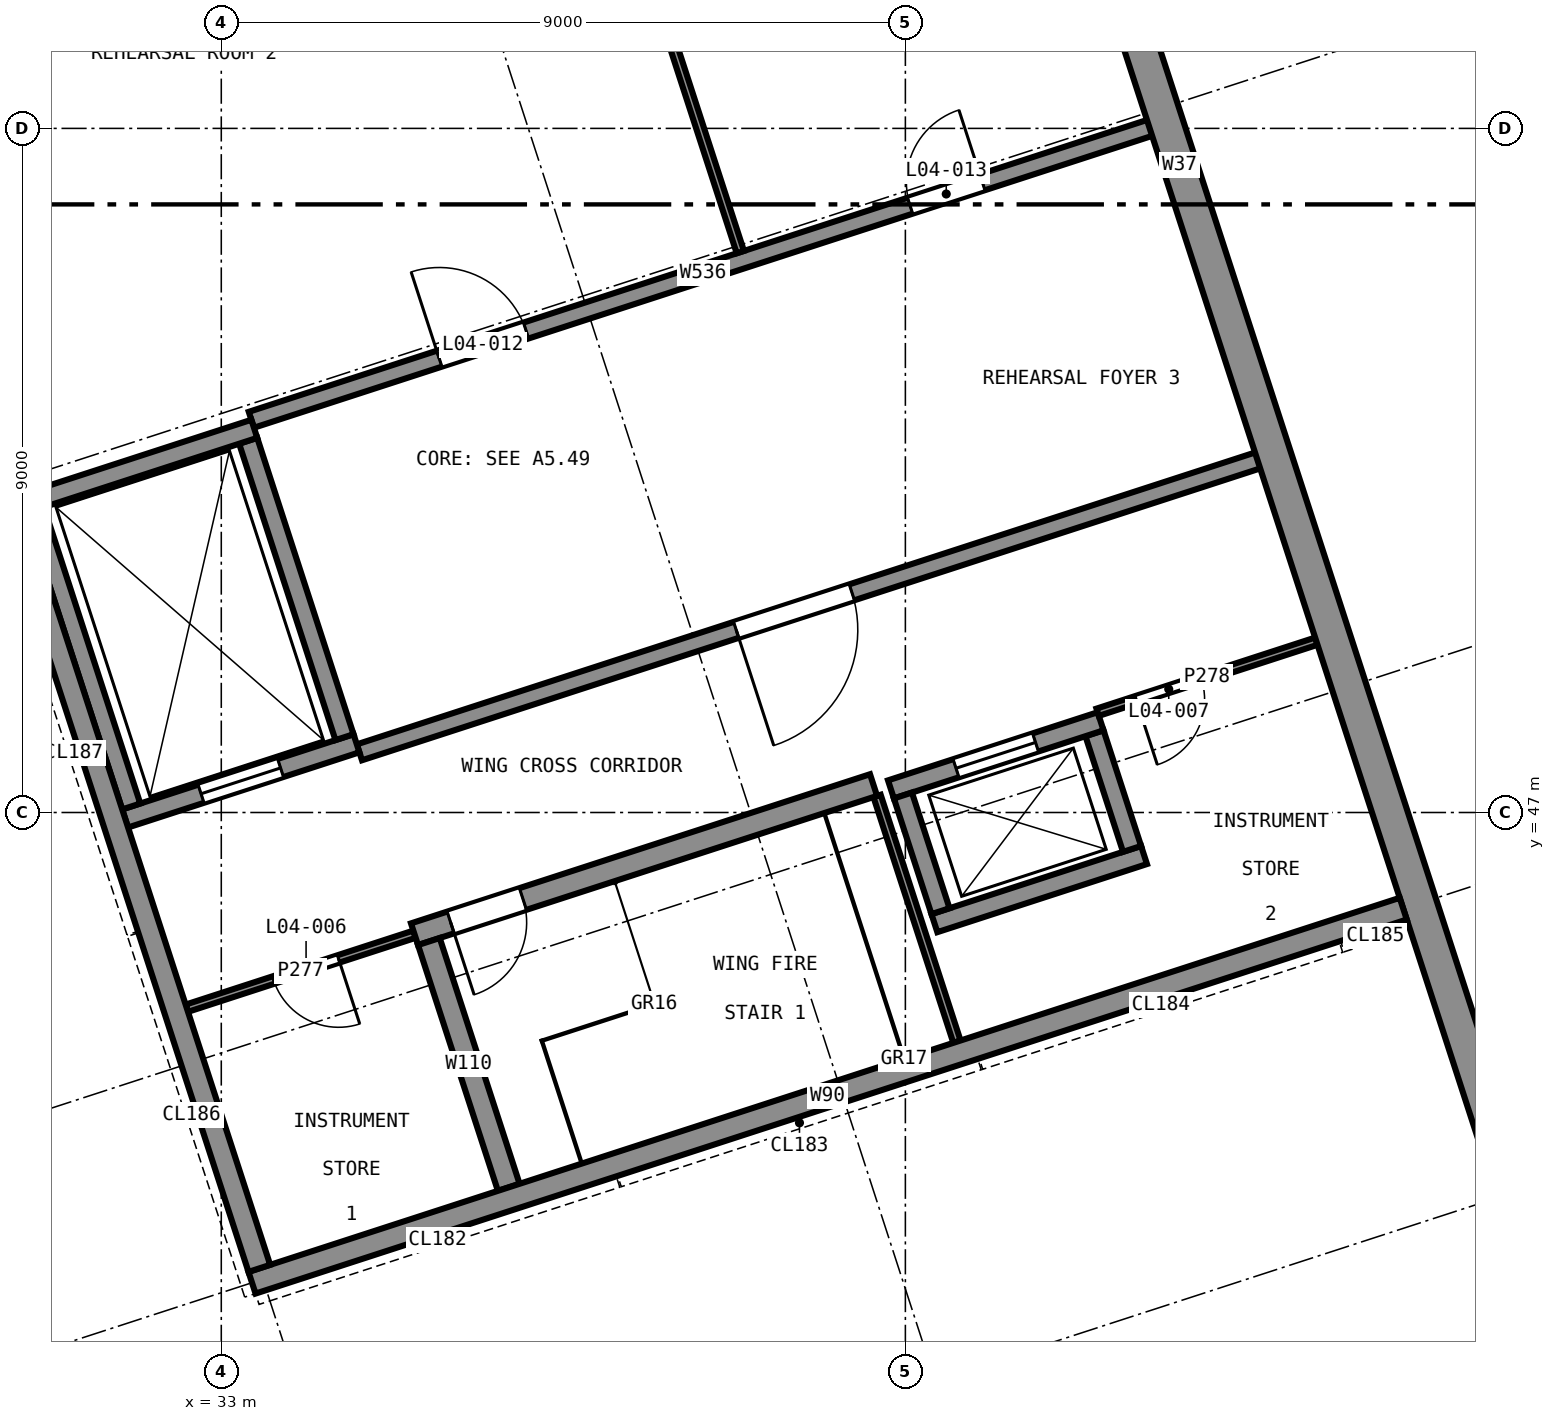
"""IFC4 building model, lengths in metres.
Left out: names, types, materials, properties, quantities, classifications, styles, units other than length and angle.
Written with IfcOpenShell. Run it as: python <this file> out.ifc"""

import sys

from ifc_helpers import new_model, si_unit, direction, frame, frame_2d, origin, place, context, subcontext, project, spatial, rectangle, extrude, element, fill, save


model = new_model("IFC4")
c1 = context("Model", 3, precision=1e-05, world=origin(), true_north=direction((0.0, 1.0)))
c2 = subcontext(c1, "Body", "Model", "MODEL_VIEW")
j1 = project(units=[si_unit("LENGTHUNIT", "METRE"), si_unit("PLANEANGLEUNIT", "RADIAN")], contexts=[c1])
p1 = place(None, origin())
s1 = spatial("IfcSite", under=j1, at=p1, CompositionType="ELEMENT")
p2 = place(p1, origin())
s2 = spatial("IfcBuilding", under=s1, at=p2, CompositionType="ELEMENT")
p3 = place(p2, frame((0.0, 0.0, 17.5)))
s3 = spatial("IfcBuildingStorey", under=s2, at=p3, CompositionType="ELEMENT", Elevation=17.5)
p4 = place(p3, frame((49.93, 42.214, 0.0), z_axis=(0.0, 0.0, 1.0), x_axis=(-0.309016215614, 0.95105676933, 0.0)))
e1 = element("IfcWall", 1, at=p4, inside=s3, PredefinedType="SHEAR", context=c2, shape_type="SweptSolid", body=[
    extrude(rectangle(XDim=27.975, YDim=0.45, at=frame_2d((13.988, 0.0))), origin(), (0.0, 0.0, 1.0), 4.0),
])
p5 = place(p3, frame((48.55, 45.735, 0.0), z_axis=(0.0, 0.0, 1.0), x_axis=(-0.951061216338, -0.309002528757, 0.0)))
e2 = element("IfcWall", 2, at=p5, inside=s3, PredefinedType="SOLIDWALL", context=c2, shape_type="SweptSolid", body=[
    extrude(rectangle(XDim=15.925, YDim=0.3, at=frame_2d((7.962, 0.0))), origin(), (0.0, 0.0, 1.0), 4.0),
])
p6 = place(p3, frame((33.501, 41.003, 0.0), z_axis=(0.0, 0.0, 1.0), x_axis=(-0.309018056255, 0.951056171269, 0.0)))
e3 = element("IfcWall", 3, at=p6, inside=s3, PredefinedType="SOLIDWALL", context=c2, shape_type="SweptSolid", body=[
    extrude(rectangle(XDim=23.7, YDim=0.3, at=frame_2d((11.85, 0.0))), origin(), (0.0, 0.0, 1.0), 4.0),
])
p7 = place(p6, frame((11.55, 0.0, 0.9)))
e4 = element("IfcOpeningElement", 4, at=p7, cuts=e3, PredefinedType="OPENING", context=c2, shape_type="SweptSolid", body=[
    extrude(rectangle(XDim=3.6, YDim=2.1, at=frame_2d((1.8, 1.05))), frame((0.0, 0.16, 0.0), z_axis=(0.0, -1.0, 0.0), x_axis=(1.0, 0.0, 0.0)), (0.0, 0.0, 1.0), 0.32),
])
p8 = place(p3, frame((41.581, 47.361, 0.0), z_axis=(0.0, 0.0, 1.0), x_axis=(-0.951058929949, -0.309009565815, 0.0)))
e5 = element("IfcWall", 5, at=p8, inside=s3, PredefinedType="SOLIDWALL", context=c2, shape_type="SweptSolid", body=[
    extrude(rectangle(XDim=6.35, YDim=0.3, at=frame_2d((3.175, 0.0))), origin(), (0.0, 0.0, 1.0), 3.7),
])
p9 = place(p8, frame((4.85, 0.0, 0.0)))
e6 = element("IfcOpeningElement", 6, at=p9, cuts=e5, PredefinedType="OPENING", context=c2, shape_type="SweptSolid", body=[
    extrude(rectangle(XDim=1.0, YDim=2.1, at=frame_2d((0.5, 1.05))), frame((0.0, 0.16, 0.0), z_axis=(0.0, -1.0, 0.0), x_axis=(1.0, 0.0, 0.0)), (0.0, 0.0, 1.0), 0.32),
])
p10 = place(p3, frame((35.731, 45.302, 0.0), z_axis=(0.0, 0.0, 1.0), x_axis=(0.308980533303, -0.951068362443, 0.0)))
e7 = element("IfcWall", 7, at=p10, inside=s3, PredefinedType="SOLIDWALL", context=c2, shape_type="SweptSolid", body=[
    extrude(rectangle(XDim=3.4, YDim=0.3, at=frame_2d((1.7, 0.0))), origin(), (0.0, 0.0, 1.0), 3.7),
])
p11 = place(p3, frame((42.382, 45.544, 0.0), z_axis=(0.0, 0.0, 1.0), x_axis=(0.951071801089, 0.308969948659, 0.0)))
e8 = element("IfcWall", 8, at=p11, inside=s3, PredefinedType="SHEAR", context=c2, shape_type="SweptSolid", body=[
    extrude(rectangle(XDim=2.9, YDim=0.25, at=frame_2d((1.45, 0.0))), origin(), (0.0, 0.0, 1.0), 4.0),
])
p12 = place(p3, frame((44.982, 46.521, 0.0), z_axis=(0.0, 0.0, 1.0), x_axis=(-0.308986014439, 0.951066581729, 0.0)))
e9 = element("IfcWall", 9, at=p12, inside=s3, PredefinedType="SHEAR", context=c2, shape_type="SweptSolid", body=[
    extrude(rectangle(XDim=1.6, YDim=0.25, at=frame_2d((0.8, 0.0))), origin(), (0.0, 0.0, 1.0), 4.0),
])
p13 = place(p3, frame((44.568, 48.2, 0.0), z_axis=(0.0, 0.0, 1.0), x_axis=(-0.951047059821, -0.309046096893, 0.0)))
e10 = element("IfcWall", 10, at=p13, inside=s3, PredefinedType="SHEAR", context=c2, shape_type="SweptSolid", body=[
    extrude(rectangle(XDim=2.9, YDim=0.25, at=frame_2d((1.45, 0.0))), origin(), (0.0, 0.0, 1.0), 4.0),
])
p14 = place(p13, frame((0.9, 0.0, 0.0)))
e11 = element("IfcOpeningElement", 11, at=p14, cuts=e10, PredefinedType="OPENING", context=c2, shape_type="SweptSolid", body=[
    extrude(rectangle(XDim=1.1, YDim=2.1, at=frame_2d((0.55, 1.05))), frame((0.0, 0.135, 0.0), z_axis=(0.0, -1.0, 0.0), x_axis=(1.0, 0.0, 0.0)), (0.0, 0.0, 1.0), 0.27),
])
p15 = place(p3, frame((41.968, 47.224, 0.0), z_axis=(0.0, 0.0, 1.0), x_axis=(0.308986014439, -0.951066581729, 0.0)))
e12 = element("IfcWall", 12, at=p15, inside=s3, PredefinedType="SHEAR", context=c2, shape_type="SweptSolid", body=[
    extrude(rectangle(XDim=1.6, YDim=0.25, at=frame_2d((0.8, 0.0))), origin(), (0.0, 0.0, 1.0), 4.0),
])
p16 = place(p3, frame((31.735, 46.922, 0.0), z_axis=(0.0, 0.0, 1.0), x_axis=(0.95104415986, 0.309055020985, 0.0)))
e13 = element("IfcWall", 13, at=p16, inside=s3, PredefinedType="SHEAR", context=c2, shape_type="SweptSolid", body=[
    extrude(rectangle(XDim=3.2, YDim=0.25, at=frame_2d((1.6, 0.0))), origin(), (0.0, 0.0, 1.0), 4.0),
])
p17 = place(p16, frame((1.05, 0.0, 0.0)))
e14 = element("IfcOpeningElement", 14, at=p17, cuts=e13, PredefinedType="OPENING", context=c2, shape_type="SweptSolid", body=[
    extrude(rectangle(XDim=1.1, YDim=2.1, at=frame_2d((0.55, 1.05))), frame((0.0, 0.135, 0.0), z_axis=(0.0, -1.0, 0.0), x_axis=(1.0, 0.0, 0.0)), (0.0, 0.0, 1.0), 0.27),
])
p18 = place(p3, frame((34.621, 47.991, 0.0), z_axis=(0.0, 0.0, 1.0), x_axis=(-0.309055103076, 0.951044133184, 0.0)))
e15 = element("IfcWall", 15, at=p18, inside=s3, PredefinedType="SHEAR", context=c2, shape_type="SweptSolid", body=[
    extrude(rectangle(XDim=4.1, YDim=0.25, at=frame_2d((2.05, 0.0))), origin(), (0.0, 0.0, 1.0), 4.0),
])
p19 = place(p3, frame((33.434, 52.048, 0.0), z_axis=(0.0, 0.0, 1.0), x_axis=(-0.951066581729, -0.308986014439, 0.0)))
e16 = element("IfcWall", 16, at=p19, inside=s3, PredefinedType="SHEAR", context=c2, shape_type="SweptSolid", body=[
    extrude(rectangle(XDim=3.2, YDim=0.25, at=frame_2d((1.6, 0.0))), origin(), (0.0, 0.0, 1.0), 4.0),
])
p20 = place(p3, frame((30.548, 50.979, 0.0), z_axis=(0.0, 0.0, 1.0), x_axis=(0.309055103076, -0.951044133184, 0.0)))
e17 = element("IfcWall", 17, at=p20, inside=s3, PredefinedType="SHEAR", context=c2, shape_type="SweptSolid", body=[
    extrude(rectangle(XDim=4.1, YDim=0.25, at=frame_2d((2.05, 0.0))), origin(), (0.0, 0.0, 1.0), 4.0),
])
p21 = place(p3, frame((33.396, 52.167, 0.0), z_axis=(0.0, 0.0, 1.0), x_axis=(0.951054448053, 0.309023359697, 0.0)))
e18 = element("IfcWall", 18, at=p21, inside=s3, PredefinedType="SOLIDWALL", context=c2, shape_type="SweptSolid", body=[
    extrude(rectangle(XDim=12.5, YDim=0.22, at=frame_2d((6.25, 0.0))), origin(), (0.0, 0.0, 1.0), 3.7),
])
p22 = place(p21, frame((2.6, 0.0, 0.0)))
e19 = element("IfcOpeningElement", 19, at=p22, cuts=e18, PredefinedType="OPENING", context=c2, shape_type="SweptSolid", body=[
    extrude(rectangle(XDim=1.2, YDim=2.1, at=frame_2d((0.6, 1.05))), frame((0.0, 0.12, 0.0), z_axis=(0.0, -1.0, 0.0), x_axis=(1.0, 0.0, 0.0)), (0.0, 0.0, 1.0), 0.24),
])
p23 = place(p21, frame((9.113, 0.0, 0.0)))
e20 = element("IfcOpeningElement", 20, at=p23, cuts=e18, PredefinedType="OPENING", context=c2, shape_type="SweptSolid", body=[
    extrude(rectangle(XDim=1.0, YDim=2.1, at=frame_2d((0.5, 1.05))), frame((0.0, 0.12, 0.0), z_axis=(0.0, -1.0, 0.0), x_axis=(1.0, 0.0, 0.0)), (0.0, 0.0, 1.0), 0.24),
])
p24 = place(p3, frame((34.817, 47.792, 0.0), z_axis=(0.0, 0.0, 1.0), x_axis=(0.951054448053, 0.309023359697, 0.0)))
e21 = element("IfcWall", 21, at=p24, inside=s3, PredefinedType="SOLIDWALL", context=c2, shape_type="SweptSolid", body=[
    extrude(rectangle(XDim=12.5, YDim=0.22, at=frame_2d((6.25, 0.0))), origin(), (0.0, 0.0, 1.0), 3.7),
])
p25 = place(p24, frame((5.212, 0.0, 0.0)))
e22 = element("IfcOpeningElement", 22, at=p25, cuts=e21, PredefinedType="OPENING", context=c2, shape_type="SweptSolid", body=[
    extrude(rectangle(XDim=1.6, YDim=2.4, at=frame_2d((0.8, 1.2))), frame((0.0, 0.12, 0.0), z_axis=(0.0, -1.0, 0.0), x_axis=(1.0, 0.0, 0.0)), (0.0, 0.0, 1.0), 0.24),
])
p26 = place(p3, frame((32.546, 44.425, 0.0), z_axis=(0.0, 0.0, 1.0), x_axis=(0.951058557014, 0.309010713619, 0.0)))
e23 = element("IfcWall", 23, at=p26, inside=s3, PredefinedType="PARTITIONING", context=c2, shape_type="SweptSolid", body=[
    extrude(rectangle(XDim=3.15, YDim=0.1, at=frame_2d((1.575, 0.0))), origin(), (0.0, 0.0, 1.0), 3.7),
])
p27 = place(p26, frame((1.2, 0.0, 0.0)))
e24 = element("IfcOpeningElement", 24, at=p27, cuts=e23, PredefinedType="OPENING", context=c2, shape_type="SweptSolid", body=[
    extrude(rectangle(XDim=0.9, YDim=2.1, at=frame_2d((0.45, 1.05))), frame((0.0, 0.06, 0.0), z_axis=(0.0, -1.0, 0.0), x_axis=(1.0, 0.0, 0.0)), (0.0, 0.0, 1.0), 0.12),
])
p28 = place(p3, frame((44.53, 48.319, 0.0), z_axis=(0.0, 0.0, 1.0), x_axis=(0.951053046121, 0.30902767427, 0.0)))
e25 = element("IfcWall", 25, at=p28, inside=s3, PredefinedType="PARTITIONING", context=c2, shape_type="SweptSolid", body=[
    extrude(rectangle(XDim=3.025, YDim=0.1, at=frame_2d((1.512, 0.0))), origin(), (0.0, 0.0, 1.0), 3.7),
])
p29 = place(p28, frame((0.533, 0.0, 0.0)))
e26 = element("IfcOpeningElement", 26, at=p29, cuts=e25, PredefinedType="OPENING", context=c2, shape_type="SweptSolid", body=[
    extrude(rectangle(XDim=0.9, YDim=2.1, at=frame_2d((0.45, 1.05))), frame((0.0, 0.06, 0.0), z_axis=(0.0, -1.0, 0.0), x_axis=(1.0, 0.0, 0.0)), (0.0, 0.0, 1.0), 0.12),
])
p30 = place(p3, frame((42.678, 43.985, 0.0), z_axis=(0.0, 0.0, 1.0), x_axis=(-0.309045481752, 0.951047259714, 0.0)))
e27 = element("IfcWall", 27, at=p30, inside=s3, PredefinedType="PARTITIONING", context=c2, shape_type="SweptSolid", body=[
    extrude(rectangle(XDim=3.4, YDim=0.1, at=frame_2d((1.7, 0.0))), origin(), (0.0, 0.0, 1.0), 3.7),
])
p31 = place(p3, frame((39.829, 54.373, 0.0), z_axis=(0.0, 0.0, 1.0), x_axis=(-0.309021722829, 0.951054979914, 0.0)))
e28 = element("IfcWall", 28, at=p31, inside=s3, PredefinedType="PARTITIONING", context=c2, shape_type="SweptSolid", body=[
    extrude(rectangle(XDim=9.78, YDim=0.1, at=frame_2d((4.89, 0.0))), origin(), (0.0, 0.0, 1.0), 3.7),
])
p32 = place(p14, origin())
e29 = element("IfcDoor", 29, at=p32, inside=s3, OperationType="SLIDING_TO_LEFT", PredefinedType="DOOR", context=c2, shape_type="SweptSolid", body=[
    extrude(rectangle(XDim=1.1, YDim=2.1, at=frame_2d((0.55, 1.05))), frame((0.0, 0.025, 0.0), z_axis=(0.0, -1.0, 0.0), x_axis=(1.0, 0.0, 0.0)), (0.0, 0.0, 1.0), 0.05),
])
fill(e11, e29)
p33 = place(p17, origin())
e30 = element("IfcDoor", 30, at=p33, inside=s3, OperationType="SLIDING_TO_LEFT", PredefinedType="DOOR", context=c2, shape_type="SweptSolid", body=[
    extrude(rectangle(XDim=1.1, YDim=2.1, at=frame_2d((0.55, 1.05))), frame((0.0, 0.025, 0.0), z_axis=(0.0, -1.0, 0.0), x_axis=(1.0, 0.0, 0.0)), (0.0, 0.0, 1.0), 0.05),
])
fill(e14, e30)
p34 = place(p27, frame((0.9, 0.0, 0.0), z_axis=(0.0, 0.0, 1.0), x_axis=(-1.0, 0.0, 0.0)))
e31 = element("IfcDoor", 31, at=p34, inside=s3, OperationType="SINGLE_SWING_RIGHT", PredefinedType="DOOR", context=c2, shape_type="SweptSolid", body=[
    extrude(rectangle(XDim=0.9, YDim=2.1, at=frame_2d((0.45, 1.05))), frame((0.0, 0.025, 0.0), z_axis=(0.0, -1.0, 0.0), x_axis=(1.0, 0.0, 0.0)), (0.0, 0.0, 1.0), 0.05),
])
fill(e24, e31)
p35 = place(p29, frame((0.9, 0.0, 0.0), z_axis=(0.0, 0.0, 1.0), x_axis=(-1.0, 0.0, 0.0)))
e32 = element("IfcDoor", 32, at=p35, inside=s3, OperationType="SINGLE_SWING_LEFT", PredefinedType="DOOR", context=c2, shape_type="SweptSolid", body=[
    extrude(rectangle(XDim=0.9, YDim=2.1, at=frame_2d((0.45, 1.05))), frame((0.0, 0.025, 0.0), z_axis=(0.0, -1.0, 0.0), x_axis=(1.0, 0.0, 0.0)), (0.0, 0.0, 1.0), 0.05),
])
fill(e26, e32)
p36 = place(p25, frame((1.6, 0.0, 0.0), z_axis=(0.0, 0.0, 1.0), x_axis=(-1.0, 0.0, 0.0)))
e33 = element("IfcDoor", 33, at=p36, inside=s3, OperationType="DOUBLE_DOOR_SINGLE_SWING", PredefinedType="DOOR", context=c2, shape_type="SweptSolid", body=[
    extrude(rectangle(XDim=1.6, YDim=2.4, at=frame_2d((0.8, 1.2))), frame((0.0, 0.025, 0.0), z_axis=(0.0, -1.0, 0.0), x_axis=(1.0, 0.0, 0.0)), (0.0, 0.0, 1.0), 0.05),
])
fill(e22, e33)
p37 = place(p22, origin())
e34 = element("IfcDoor", 34, at=p37, inside=s3, OperationType="SINGLE_SWING_RIGHT", PredefinedType="DOOR", context=c2, shape_type="SweptSolid", body=[
    extrude(rectangle(XDim=1.2, YDim=2.1, at=frame_2d((0.6, 1.05))), frame((0.0, 0.025, 0.0), z_axis=(0.0, -1.0, 0.0), x_axis=(1.0, 0.0, 0.0)), (0.0, 0.0, 1.0), 0.05),
])
fill(e19, e34)
p38 = place(p23, origin())
e35 = element("IfcDoor", 35, at=p38, inside=s3, OperationType="SINGLE_SWING_LEFT", PredefinedType="DOOR", context=c2, shape_type="SweptSolid", body=[
    extrude(rectangle(XDim=1.0, YDim=2.1, at=frame_2d((0.5, 1.05))), frame((0.0, 0.025, 0.0), z_axis=(0.0, -1.0, 0.0), x_axis=(1.0, 0.0, 0.0)), (0.0, 0.0, 1.0), 0.05),
])
fill(e20, e35)
p39 = place(p9, origin())
e36 = element("IfcDoor", 36, at=p39, inside=s3, OperationType="SINGLE_SWING_LEFT", PredefinedType="DOOR", context=c2, shape_type="SweptSolid", body=[
    extrude(rectangle(XDim=1.0, YDim=2.1, at=frame_2d((0.5, 1.05))), frame((0.0, 0.025, 0.0), z_axis=(0.0, -1.0, 0.0), x_axis=(1.0, 0.0, 0.0)), (0.0, 0.0, 1.0), 0.05),
])
fill(e6, e36)
save(model, sys.argv[1])
